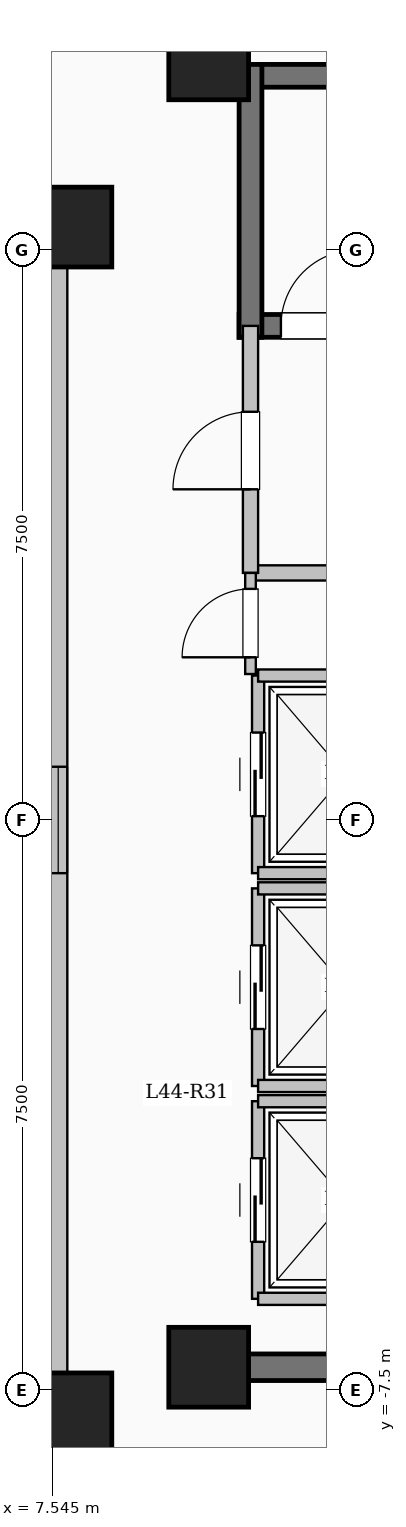
"""IFC4 building model, lengths in metres.
Left out: names, types, materials, properties, quantities, classifications, styles, units other than length and angle.
Written with IfcOpenShell. Run it as: python <this file> out.ifc"""

import sys

from ifc_helpers import new_model, si_unit, direction, frame, frame_2d, origin, origin_2d, place, context, subcontext, project, spatial, rectangle, extrude, element, fill, save


model = new_model("IFC4")
c1 = context("Model", 3, precision=1e-05, world=origin(), true_north=direction((0.0, 1.0)))
c2 = subcontext(c1, "Body", "Model", "MODEL_VIEW")
j1 = project(units=[si_unit("LENGTHUNIT", "METRE"), si_unit("PLANEANGLEUNIT", "RADIAN")], contexts=[c1])
p1 = place(None, origin())
s1 = spatial("IfcSite", under=j1, at=p1, CompositionType="ELEMENT")
p2 = place(p1, origin())
s2 = spatial("IfcBuilding", under=s1, at=p2, CompositionType="ELEMENT")
p3 = place(p2, frame((0.0, 0.0, 162.75)))
s3 = spatial("IfcBuildingStorey", under=s2, at=p3, CompositionType="ELEMENT", Elevation=162.75)
for number, where, z_axis, x_axis in (
    (1, (7.8, -7.8, 0.0), (0.0, 0.0, 1.0), (1.0, 0.0, 0.0)),
    (2, (7.8, 7.8, 0.0), (0.0, 0.0, 1.0), (1.0, 0.0, 0.0)),
    (3, (9.6, -7.2, 0.0), (0.0, 0.0, 1.0), (1.0, 0.0, 0.0)),
    (4, (9.6, 10.0, 0.0), (0.0, 0.0, 1.0), (1.0, 0.0, 0.0)),
):
    element("IfcColumn", number, at=place(p3, frame(where, z_axis=z_axis, x_axis=x_axis)), inside=s3, PredefinedType="COLUMN", context=c2, shape_type="SweptSolid", body=[
        extrude(rectangle(XDim=1.05, YDim=1.05, at=origin_2d()), origin(), (0.0, 0.0, 1.0), 3.35),
    ])
p4 = place(p3, frame((-7.62, -7.62, 0.0), z_axis=(0.0, 0.0, 1.0), x_axis=(1.0, 0.0, 0.0)))
e5 = element("IfcWall", 5, at=p4, inside=s3, PredefinedType="SOLIDWALL", context=c2, shape_type="SweptSolid", body=[
    extrude(rectangle(XDim=15.24, YDim=0.24, at=frame_2d((7.62, 0.0))), origin(), (0.0, 0.0, 1.0), 3.1),
])
p5 = place(p4, frame((6.92, 0.0, 0.95)))
e6 = element("IfcOpeningElement", 6, at=p5, cuts=e5, PredefinedType="OPENING", context=c2, shape_type="SweptSolid", body=[
    extrude(rectangle(XDim=1.4, YDim=1.5, at=frame_2d((0.7, 0.75))), frame((0.0, 0.13, 0.0), z_axis=(0.0, -1.0, 0.0), x_axis=(1.0, 0.0, 0.0)), (0.0, 0.0, 1.0), 0.26),
])
p6 = place(p3, frame((7.62, -7.62, 0.0), z_axis=(0.0, 0.0, 1.0), x_axis=(0.0, 1.0, 0.0)))
e7 = element("IfcWall", 7, at=p6, inside=s3, PredefinedType="SOLIDWALL", context=c2, shape_type="SweptSolid", body=[
    extrude(rectangle(XDim=15.24, YDim=0.24, at=frame_2d((7.62, 0.0))), origin(), (0.0, 0.0, 1.0), 3.1),
])
p7 = place(p6, frame((6.92, 0.0, 0.95)))
e8 = element("IfcOpeningElement", 8, at=p7, cuts=e7, PredefinedType="OPENING", context=c2, shape_type="SweptSolid", body=[
    extrude(rectangle(XDim=1.4, YDim=1.5, at=frame_2d((0.7, 0.75))), frame((0.0, 0.13, 0.0), z_axis=(0.0, -1.0, 0.0), x_axis=(1.0, 0.0, 0.0)), (0.0, 0.0, 1.0), 0.26),
])
p8 = place(p3, frame((7.62, 7.62, 0.0), z_axis=(0.0, 0.0, 1.0), x_axis=(-1.0, 0.0, 0.0)))
e9 = element("IfcWall", 9, at=p8, inside=s3, PredefinedType="SOLIDWALL", context=c2, shape_type="SweptSolid", body=[
    extrude(rectangle(XDim=15.24, YDim=0.24, at=frame_2d((7.62, 0.0))), origin(), (0.0, 0.0, 1.0), 3.1),
])
p9 = place(p8, frame((6.92, 0.0, 0.95)))
e10 = element("IfcOpeningElement", 10, at=p9, cuts=e9, PredefinedType="OPENING", context=c2, shape_type="SweptSolid", body=[
    extrude(rectangle(XDim=1.4, YDim=1.5, at=frame_2d((0.7, 0.75))), frame((0.0, 0.13, 0.0), z_axis=(0.0, -1.0, 0.0), x_axis=(1.0, 0.0, 0.0)), (0.0, 0.0, 1.0), 0.26),
])
p10 = place(p3, frame((10.0, 9.79, 0.0), z_axis=(0.0, 0.0, 1.0), x_axis=(1.0, 0.0, 0.0)))
e11 = element("IfcWall", 11, at=p10, inside=s3, PredefinedType="SHEAR", context=c2, shape_type="SweptSolid", body=[
    extrude(rectangle(XDim=8.0, YDim=0.3, at=frame_2d((4.0, 0.0))), origin(), (0.0, 0.0, 1.0), 3.35),
])
p11 = place(p3, frame((10.0, 6.5, 0.0), z_axis=(0.0, 0.0, 1.0), x_axis=(1.0, 0.0, 0.0)))
e12 = element("IfcWall", 12, at=p11, inside=s3, PredefinedType="SHEAR", context=c2, shape_type="SweptSolid", body=[
    extrude(rectangle(XDim=8.0, YDim=0.3, at=frame_2d((4.0, 0.0))), origin(), (0.0, 0.0, 1.0), 3.35),
])
p12 = place(p11, frame((0.55, 0.0, 0.0)))
e13 = element("IfcOpeningElement", 13, at=p12, cuts=e12, PredefinedType="OPENING", context=c2, shape_type="SweptSolid", body=[
    extrude(rectangle(XDim=1.0, YDim=2.15, at=frame_2d((0.5, 1.075))), frame((0.0, 0.16, 0.0), z_axis=(0.0, -1.0, 0.0), x_axis=(1.0, 0.0, 0.0)), (0.0, 0.0, 1.0), 0.32),
])
p13 = place(p3, frame((10.15, 6.35, 0.0), z_axis=(0.0, 0.0, 1.0), x_axis=(0.0, 1.0, 0.0)))
e14 = element("IfcWall", 14, at=p13, inside=s3, PredefinedType="SHEAR", context=c2, shape_type="SweptSolid", body=[
    extrude(rectangle(XDim=3.59, YDim=0.3, at=frame_2d((1.795, 0.0))), origin(), (0.0, 0.0, 1.0), 3.35),
])
p14 = place(p3, frame((10.15, 3.25, 0.0), z_axis=(0.0, 0.0, 1.0), x_axis=(1.0, 0.0, 0.0)))
e15 = element("IfcWall", 15, at=p14, inside=s3, PredefinedType="SOLIDWALL", context=c2, shape_type="SweptSolid", body=[
    extrude(rectangle(XDim=5.4, YDim=0.2, at=frame_2d((2.7, 0.0))), origin(), (0.0, 0.0, 1.0), 3.1),
])
p15 = place(p3, frame((10.15, 3.25, 0.0), z_axis=(0.0, 0.0, 1.0), x_axis=(0.0, 1.0, 0.0)))
e16 = element("IfcWall", 16, at=p15, inside=s3, PredefinedType="SOLIDWALL", context=c2, shape_type="SweptSolid", body=[
    extrude(rectangle(XDim=3.25, YDim=0.2, at=frame_2d((1.625, 0.0))), origin(), (0.0, 0.0, 1.0), 3.1),
])
p16 = place(p15, frame((1.1, 0.0, 0.0)))
e17 = element("IfcOpeningElement", 17, at=p16, cuts=e16, PredefinedType="OPENING", context=c2, shape_type="SweptSolid", body=[
    extrude(rectangle(XDim=1.02, YDim=2.15, at=frame_2d((0.51, 1.075))), frame((0.0, 0.11, 0.0), z_axis=(0.0, -1.0, 0.0), x_axis=(1.0, 0.0, 0.0)), (0.0, 0.0, 1.0), 0.22),
])
p17 = place(p3, frame((10.25, -6.3, 0.0), z_axis=(0.0, 0.0, 1.0), x_axis=(0.0, 1.0, 0.0)))
e18 = element("IfcWall", 18, at=p17, inside=s3, PredefinedType="SOLIDWALL", context=c2, shape_type="SweptSolid", body=[
    extrude(rectangle(XDim=2.6, YDim=0.16, at=frame_2d((1.3, 0.0))), origin(), (0.0, 0.0, 1.0), 3.1),
])
p18 = place(p17, frame((0.75, 0.0, 0.0)))
e19 = element("IfcOpeningElement", 19, at=p18, cuts=e18, PredefinedType="OPENING", context=c2, shape_type="SweptSolid", body=[
    extrude(rectangle(XDim=1.1, YDim=2.15, at=frame_2d((0.55, 1.075))), frame((0.0, 0.09, 0.0), z_axis=(0.0, -1.0, 0.0), x_axis=(1.0, 0.0, 0.0)), (0.0, 0.0, 1.0), 0.18),
])
for number, where, z_axis, x_axis in (
    (20, (10.25, -6.3, 0.0), (0.0, 0.0, 1.0), (1.0, 0.0, 0.0)),
    (21, (10.25, -3.7, 0.0), (0.0, 0.0, 1.0), (1.0, 0.0, 0.0)),
):
    element("IfcWall", number, at=place(p3, frame(where, z_axis=z_axis, x_axis=x_axis)), inside=s3, PredefinedType="SOLIDWALL", context=c2, shape_type="SweptSolid", body=[
        extrude(rectangle(XDim=2.3, YDim=0.16, at=frame_2d((1.15, 0.0))), origin(), (0.0, 0.0, 1.0), 3.1),
    ])
p19 = place(p3, frame((10.25, -3.5, 0.0), z_axis=(0.0, 0.0, 1.0), x_axis=(0.0, 1.0, 0.0)))
e22 = element("IfcWall", 22, at=p19, inside=s3, PredefinedType="SOLIDWALL", context=c2, shape_type="SweptSolid", body=[
    extrude(rectangle(XDim=2.6, YDim=0.16, at=frame_2d((1.3, 0.0))), origin(), (0.0, 0.0, 1.0), 3.1),
])
p20 = place(p19, frame((0.75, 0.0, 0.0)))
e23 = element("IfcOpeningElement", 23, at=p20, cuts=e22, PredefinedType="OPENING", context=c2, shape_type="SweptSolid", body=[
    extrude(rectangle(XDim=1.1, YDim=2.15, at=frame_2d((0.55, 1.075))), frame((0.0, 0.09, 0.0), z_axis=(0.0, -1.0, 0.0), x_axis=(1.0, 0.0, 0.0)), (0.0, 0.0, 1.0), 0.18),
])
for number, where, z_axis, x_axis in (
    (24, (10.25, -3.5, 0.0), (0.0, 0.0, 1.0), (1.0, 0.0, 0.0)),
    (25, (10.25, -0.9, 0.0), (0.0, 0.0, 1.0), (1.0, 0.0, 0.0)),
):
    element("IfcWall", number, at=place(p3, frame(where, z_axis=z_axis, x_axis=x_axis)), inside=s3, PredefinedType="SOLIDWALL", context=c2, shape_type="SweptSolid", body=[
        extrude(rectangle(XDim=2.3, YDim=0.16, at=frame_2d((1.15, 0.0))), origin(), (0.0, 0.0, 1.0), 3.1),
    ])
p21 = place(p3, frame((10.25, -0.7, 0.0), z_axis=(0.0, 0.0, 1.0), x_axis=(0.0, 1.0, 0.0)))
e26 = element("IfcWall", 26, at=p21, inside=s3, PredefinedType="SOLIDWALL", context=c2, shape_type="SweptSolid", body=[
    extrude(rectangle(XDim=2.6, YDim=0.16, at=frame_2d((1.3, 0.0))), origin(), (0.0, 0.0, 1.0), 3.1),
])
p22 = place(p21, frame((0.75, 0.0, 0.0)))
e27 = element("IfcOpeningElement", 27, at=p22, cuts=e26, PredefinedType="OPENING", context=c2, shape_type="SweptSolid", body=[
    extrude(rectangle(XDim=1.1, YDim=2.15, at=frame_2d((0.55, 1.075))), frame((0.0, 0.09, 0.0), z_axis=(0.0, -1.0, 0.0), x_axis=(1.0, 0.0, 0.0)), (0.0, 0.0, 1.0), 0.18),
])
for number, where, z_axis, x_axis in (
    (28, (10.25, -0.7, 0.0), (0.0, 0.0, 1.0), (1.0, 0.0, 0.0)),
    (29, (10.25, 1.9, 0.0), (0.0, 0.0, 1.0), (1.0, 0.0, 0.0)),
):
    element("IfcWall", number, at=place(p3, frame(where, z_axis=z_axis, x_axis=x_axis)), inside=s3, PredefinedType="SOLIDWALL", context=c2, shape_type="SweptSolid", body=[
        extrude(rectangle(XDim=2.3, YDim=0.16, at=frame_2d((1.15, 0.0))), origin(), (0.0, 0.0, 1.0), 3.1),
    ])
p23 = place(p3, frame((10.075, -7.2, 0.0), z_axis=(0.0, 0.0, 1.0), x_axis=(1.0, 0.0, 0.0)))
e30 = element("IfcWall", 30, at=p23, inside=s3, PredefinedType="SHEAR", context=c2, shape_type="SweptSolid", body=[
    extrude(rectangle(XDim=8.55, YDim=0.35, at=frame_2d((4.275, 0.0))), origin(), (0.0, 0.0, 1.0), 3.35),
])
p24 = place(p3, frame((10.15, 1.92, 0.0), z_axis=(0.0, 0.0, 1.0), x_axis=(0.0, 1.0, 0.0)))
e31 = element("IfcWall", 31, at=p24, inside=s3, PredefinedType="PARTITIONING", context=c2, shape_type="SweptSolid", body=[
    extrude(rectangle(XDim=1.33, YDim=0.14, at=frame_2d((0.665, 0.0))), origin(), (0.0, 0.0, 1.0), 3.1),
])
p25 = place(p24, frame((0.22, 0.0, 0.0)))
e32 = element("IfcOpeningElement", 32, at=p25, cuts=e31, PredefinedType="OPENING", context=c2, shape_type="SweptSolid", body=[
    extrude(rectangle(XDim=0.9, YDim=2.08, at=frame_2d((0.45, 1.04))), frame((0.0, 0.08, 0.0), z_axis=(0.0, -1.0, 0.0), x_axis=(1.0, 0.0, 0.0)), (0.0, 0.0, 1.0), 0.16),
])
p26 = place(p7, origin())
e33 = element("IfcWindow", 33, at=p26, inside=s3, PartitioningType="SINGLE_PANEL", PredefinedType="WINDOW", context=c2, shape_type="SweptSolid", body=[
    extrude(rectangle(XDim=1.4, YDim=1.5, at=frame_2d((0.7, 0.75))), frame((0.0, 0.03, 0.0), z_axis=(0.0, -1.0, 0.0), x_axis=(1.0, 0.0, 0.0)), (0.0, 0.0, 1.0), 0.06),
])
fill(e8, e33)
p27 = place(p12, origin())
e34 = element("IfcDoor", 34, at=p27, inside=s3, OperationType="SINGLE_SWING_RIGHT", PredefinedType="DOOR", context=c2, shape_type="SweptSolid", body=[
    extrude(rectangle(XDim=1.0, YDim=2.15, at=frame_2d((0.5, 1.075))), frame((0.0, 0.025, 0.0), z_axis=(0.0, -1.0, 0.0), x_axis=(1.0, 0.0, 0.0)), (0.0, 0.0, 1.0), 0.05),
])
fill(e13, e34)
p28 = place(p16, origin())
e35 = element("IfcDoor", 35, at=p28, inside=s3, OperationType="SINGLE_SWING_LEFT", PredefinedType="DOOR", context=c2, shape_type="SweptSolid", body=[
    extrude(rectangle(XDim=1.02, YDim=2.15, at=frame_2d((0.51, 1.075))), frame((0.0, 0.025, 0.0), z_axis=(0.0, -1.0, 0.0), x_axis=(1.0, 0.0, 0.0)), (0.0, 0.0, 1.0), 0.05),
])
fill(e17, e35)
p29 = place(p18, origin())
e36 = element("IfcDoor", 36, at=p29, inside=s3, OperationType="SLIDING_TO_LEFT", PredefinedType="DOOR", context=c2, shape_type="SweptSolid", body=[
    extrude(rectangle(XDim=1.1, YDim=2.15, at=frame_2d((0.55, 1.075))), frame((0.0, 0.025, 0.0), z_axis=(0.0, -1.0, 0.0), x_axis=(1.0, 0.0, 0.0)), (0.0, 0.0, 1.0), 0.05),
])
fill(e19, e36)
p30 = place(p20, origin())
e37 = element("IfcDoor", 37, at=p30, inside=s3, OperationType="SLIDING_TO_LEFT", PredefinedType="DOOR", context=c2, shape_type="SweptSolid", body=[
    extrude(rectangle(XDim=1.1, YDim=2.15, at=frame_2d((0.55, 1.075))), frame((0.0, 0.025, 0.0), z_axis=(0.0, -1.0, 0.0), x_axis=(1.0, 0.0, 0.0)), (0.0, 0.0, 1.0), 0.05),
])
fill(e23, e37)
p31 = place(p22, origin())
e38 = element("IfcDoor", 38, at=p31, inside=s3, OperationType="SLIDING_TO_LEFT", PredefinedType="DOOR", context=c2, shape_type="SweptSolid", body=[
    extrude(rectangle(XDim=1.1, YDim=2.15, at=frame_2d((0.55, 1.075))), frame((0.0, 0.025, 0.0), z_axis=(0.0, -1.0, 0.0), x_axis=(1.0, 0.0, 0.0)), (0.0, 0.0, 1.0), 0.05),
])
fill(e27, e38)
p32 = place(p25, origin())
e39 = element("IfcDoor", 39, at=p32, inside=s3, OperationType="SINGLE_SWING_LEFT", PredefinedType="DOOR", context=c2, shape_type="SweptSolid", body=[
    extrude(rectangle(XDim=0.9, YDim=2.08, at=frame_2d((0.45, 1.04))), frame((0.0, 0.025, 0.0), z_axis=(0.0, -1.0, 0.0), x_axis=(1.0, 0.0, 0.0)), (0.0, 0.0, 1.0), 0.05),
])
fill(e32, e39)
save(model, sys.argv[1])
